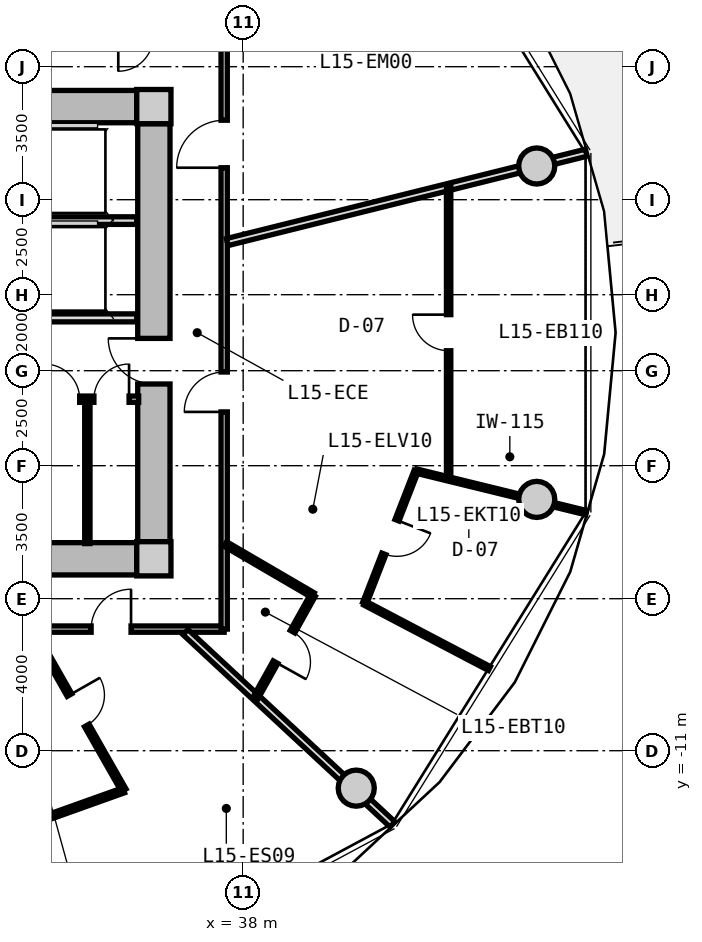
"""IFC4 building model, lengths in metres.
Left out: names, types, materials, properties, quantities, classifications, styles, units other than length and angle.
Written with IfcOpenShell. Run it as: python <this file> out.ifc"""

import sys

from ifc_helpers import new_model, si_unit, direction, frame, frame_2d, origin, origin_2d, place, context, subcontext, project, spatial, rectangle, circle, extrude, source, transform, mapped, element, fill, save


model = new_model("IFC4")
c1 = context("Model", 3, precision=1e-05, world=origin(), true_north=direction((0.0, 1.0)))
c2 = subcontext(c1, "Body", "Model", "MODEL_VIEW")
j1 = project(units=[si_unit("LENGTHUNIT", "METRE"), si_unit("PLANEANGLEUNIT", "RADIAN")], contexts=[c1])
p1 = place(None, origin())
s1 = spatial("IfcSite", under=j1, at=p1, CompositionType="ELEMENT")
p2 = place(p1, origin())
s2 = spatial("IfcBuilding", under=s1, at=p2, CompositionType="ELEMENT")
p3 = place(p2, frame((0.0, 0.0, 52.1)))
s3 = spatial("IfcBuildingStorey", under=s2, at=p3, CompositionType="ELEMENT", Elevation=52.1)
m1 = source(origin(), c2, "Body", "SweptSolid", [
    extrude(rectangle(XDim=0.9, YDim=0.9, at=origin_2d()), origin(), (0.0, 0.0, 1.0), 3.05),
])
for number, where, z_axis, x_axis in (
    (1, (35.65, -5.95, 0.0), (0.0, 0.0, 1.0), (1.0, 0.0, 0.0)),
    (2, (35.65, 5.95, 0.0), (0.0, 0.0, 1.0), (1.0, 0.0, 0.0)),
):
    element("IfcColumn", number, at=place(p3, frame(where, z_axis=z_axis, x_axis=x_axis)), inside=s3, PredefinedType="COLUMN", context=c2, shape_type="MappedRepresentation", body=[
        mapped(m1, transform((0.0, 0.0, 0.0), x_axis=(1.0, 0.0, 0.0), y_axis=(0.0, 1.0, 0.0), z_axis=(0.0, 0.0, 1.0), scale=1.0)),
    ])
m2 = source(origin(), c2, "Body", "SweptSolid", [
    extrude(rectangle(XDim=14.4, YDim=0.85, at=frame_2d((7.2, 0.0))), origin(), (0.0, 0.0, 1.0), 2.79),
])
for number, where, z_axis, x_axis in (
    (3, (20.8, 5.95, 0.0), (0.0, 0.0, 1.0), (1.0, 0.0, 0.0)),
    (4, (35.2, -5.95, 0.0), (0.0, 0.0, 1.0), (-1.0, 0.0, 0.0)),
):
    element("IfcWall", number, at=place(p3, frame(where, z_axis=z_axis, x_axis=x_axis)), inside=s3, PredefinedType="SHEAR", context=c2, shape_type="MappedRepresentation", body=[
        mapped(m2, transform((0.0, 0.0, 0.0), x_axis=(1.0, 0.0, 0.0), y_axis=(0.0, 1.0, 0.0), z_axis=(0.0, 0.0, 1.0), scale=1.0)),
    ])
m3 = source(origin(), c2, "Body", "SweptSolid", [
    extrude(rectangle(XDim=11.0, YDim=0.85, at=frame_2d((5.5, 0.0))), origin(), (0.0, 0.0, 1.0), 2.79),
])
p4 = place(p3, frame((35.65, 5.5, 0.0), z_axis=(0.0, 0.0, 1.0), x_axis=(0.0, -1.0, 0.0)))
e5 = element("IfcWall", 5, at=p4, inside=s3, PredefinedType="SHEAR", context=c2, shape_type="MappedRepresentation", body=[
    mapped(m3, transform((0.0, 0.0, 0.0), x_axis=(1.0, 0.0, 0.0), y_axis=(0.0, 1.0, 0.0), z_axis=(0.0, 0.0, 1.0), scale=1.0)),
])
p5 = place(p4, frame((5.65, 0.0, 0.0)))
e6 = element("IfcOpeningElement", 6, at=p5, cuts=e5, PredefinedType="OPENING", context=c2, shape_type="SweptSolid", body=[
    extrude(rectangle(XDim=1.2, YDim=2.15, at=frame_2d((0.6, 1.075))), frame((0.0, 0.435, 0.0), z_axis=(0.0, -1.0, 0.0), x_axis=(1.0, 0.0, 0.0)), (0.0, 0.0, 1.0), 0.87),
])
m4 = source(origin(), c2, "Body", "SweptSolid", [
    extrude(circle(Radius=0.475, at=origin_2d()), origin(), (0.0, 0.0, 1.0), 3.05),
])
for number, where, z_axis, x_axis in (
    (7, (45.725, 4.387, 0.0), (0.0, 0.0, 1.0), (1.0, 0.0, 0.0)),
    (8, (40.975, -11.985, 0.0), (0.0, 0.0, 1.0), (1.0, 0.0, 0.0)),
    (9, (45.725, -4.387, 0.0), (0.0, 0.0, 1.0), (1.0, 0.0, 0.0)),
):
    element("IfcColumn", number, at=place(p3, frame(where, z_axis=z_axis, x_axis=x_axis)), inside=s3, PredefinedType="COLUMN", context=c2, shape_type="MappedRepresentation", body=[
        mapped(m4, transform((0.0, 0.0, 0.0), x_axis=(1.0, 0.0, 0.0), y_axis=(0.0, 1.0, 0.0), z_axis=(0.0, 0.0, 1.0), scale=1.0)),
    ])
m5 = source(origin(), c2, "Body", "SweptSolid", [
    extrude(rectangle(XDim=3.2, YDim=0.2, at=frame_2d((1.6, 0.0))), origin(), (0.0, 0.0, 1.0), 2.775),
])
p6 = place(p3, frame((32.0, 2.95, 0.0), z_axis=(0.0, 0.0, 1.0), x_axis=(1.0, 0.0, 0.0)))
e10 = element("IfcWall", 10, at=p6, inside=s3, PredefinedType="PARTITIONING", context=c2, shape_type="MappedRepresentation", body=[
    mapped(m5, transform((0.0, 0.0, 0.0), x_axis=(1.0, 0.0, 0.0), y_axis=(0.0, 1.0, 0.0), z_axis=(0.0, 0.0, 1.0), scale=1.0)),
])
m6 = source(origin(), c2, "Body", "SweptSolid", [
    extrude(rectangle(XDim=6.66, YDim=0.21, at=frame_2d((3.33, 0.0))), origin(), (0.0, 0.0, 1.0), 2.775),
])
p7 = place(p3, frame((28.54, 0.39, 0.0), z_axis=(0.0, 0.0, 1.0), x_axis=(1.0, 0.0, 0.0)))
e11 = element("IfcWall", 11, at=p7, inside=s3, PredefinedType="PARTITIONING", context=c2, shape_type="MappedRepresentation", body=[
    mapped(m6, transform((0.0, 0.0, 0.0), x_axis=(1.0, 0.0, 0.0), y_axis=(0.0, 1.0, 0.0), z_axis=(0.0, 0.0, 1.0), scale=1.0)),
])
p8 = place(p7, frame((1.0, 0.0, 0.0)))
e12 = element("IfcOpeningElement", 12, at=p8, cuts=e11, PredefinedType="OPENING", context=c2, shape_type="SweptSolid", body=[
    extrude(rectangle(XDim=1.2, YDim=2.15, at=frame_2d((0.6, 1.075))), frame((0.0, 0.115, 0.0), z_axis=(0.0, -1.0, 0.0), x_axis=(1.0, 0.0, 0.0)), (0.0, 0.0, 1.0), 0.23),
])
m7 = source(origin(), c2, "Body", "SweptSolid", [
    extrude(rectangle(XDim=2.7, YDim=0.165, at=frame_2d((1.35, 0.0))), origin(), (0.0, 0.0, 1.0), 2.775),
])
p9 = place(p3, frame((32.55, -1.75, 0.0), z_axis=(0.0, 0.0, 1.0), x_axis=(1.0, 0.0, 0.0)))
e13 = element("IfcWall", 13, at=p9, inside=s3, PredefinedType="PARTITIONING", context=c2, shape_type="MappedRepresentation", body=[
    mapped(m7, transform((0.0, 0.0, 0.0), x_axis=(1.0, 0.0, 0.0), y_axis=(0.0, 1.0, 0.0), z_axis=(0.0, 0.0, 1.0), scale=1.0)),
])
p10 = place(p9, frame((0.222, 0.0, 0.0)))
e14 = element("IfcOpeningElement", 14, at=p10, cuts=e13, PredefinedType="OPENING", context=c2, shape_type="SweptSolid", body=[
    extrude(rectangle(XDim=0.925, YDim=2.1, at=frame_2d((0.462, 1.05))), frame((0.0, 0.093, 0.0), z_axis=(0.0, -1.0, 0.0), x_axis=(1.0, 0.0, 0.0)), (0.0, 0.0, 1.0), 0.185),
])
p11 = place(p9, frame((1.522, 0.0, 0.0)))
e15 = element("IfcOpeningElement", 15, at=p11, cuts=e13, PredefinedType="OPENING", context=c2, shape_type="SweptSolid", body=[
    extrude(rectangle(XDim=0.925, YDim=2.1, at=frame_2d((0.462, 1.05))), frame((0.0, 0.093, 0.0), z_axis=(0.0, -1.0, 0.0), x_axis=(1.0, 0.0, 0.0)), (0.0, 0.0, 1.0), 0.185),
])
m8 = source(origin(), c2, "Body", "SweptSolid", [
    extrude(rectangle(XDim=3.8, YDim=0.14, at=frame_2d((1.9, 0.0))), origin(), (0.0, 0.0, 1.0), 2.775),
])
p12 = place(p3, frame((33.9, -5.55, 0.0), z_axis=(0.0, 0.0, 1.0), x_axis=(0.0, 1.0, 0.0)))
e16 = element("IfcWall", 16, at=p12, inside=s3, PredefinedType="PARTITIONING", context=c2, shape_type="MappedRepresentation", body=[
    mapped(m8, transform((0.0, 0.0, 0.0), x_axis=(1.0, 0.0, 0.0), y_axis=(0.0, 1.0, 0.0), z_axis=(0.0, 0.0, 1.0), scale=1.0)),
])
m9 = source(origin(), c2, "Body", "SweptSolid", [
    extrude(rectangle(XDim=19.0, YDim=0.165, at=frame_2d((9.5, 0.0))), origin(), (0.0, 0.0, 1.0), 2.775),
])
p13 = place(p3, frame((37.5, -7.8, 0.0), z_axis=(0.0, 0.0, 1.0), x_axis=(-1.0, 0.0, 0.0)))
e17 = element("IfcWall", 17, at=p13, inside=s3, PredefinedType="PARTITIONING", context=c2, shape_type="MappedRepresentation", body=[
    mapped(m9, transform((0.0, 0.0, 0.0), x_axis=(1.0, 0.0, 0.0), y_axis=(0.0, 1.0, 0.0), z_axis=(0.0, 0.0, 1.0), scale=1.0)),
])
p14 = place(p13, frame((12.706, 0.0, 0.0)))
e18 = element("IfcOpeningElement", 18, at=p14, cuts=e17, PredefinedType="OPENING", context=c2, shape_type="SweptSolid", body=[
    extrude(rectangle(XDim=1.05, YDim=2.15, at=frame_2d((0.525, 1.075))), frame((0.0, 0.093, 0.0), z_axis=(0.0, -1.0, 0.0), x_axis=(1.0, 0.0, 0.0)), (0.0, 0.0, 1.0), 0.185),
])
p15 = place(p13, frame((7.959, 0.0, 0.0)))
e19 = element("IfcOpeningElement", 19, at=p15, cuts=e17, PredefinedType="OPENING", context=c2, shape_type="SweptSolid", body=[
    extrude(rectangle(XDim=1.05, YDim=2.15, at=frame_2d((0.525, 1.075))), frame((0.0, 0.093, 0.0), z_axis=(0.0, -1.0, 0.0), x_axis=(1.0, 0.0, 0.0)), (0.0, 0.0, 1.0), 0.185),
])
p16 = place(p13, frame((2.451, 0.0, 0.0)))
e20 = element("IfcOpeningElement", 20, at=p16, cuts=e17, PredefinedType="OPENING", context=c2, shape_type="SweptSolid", body=[
    extrude(rectangle(XDim=1.05, YDim=2.15, at=frame_2d((0.525, 1.075))), frame((0.0, 0.093, 0.0), z_axis=(0.0, -1.0, 0.0), x_axis=(1.0, 0.0, 0.0)), (0.0, 0.0, 1.0), 0.185),
])
m10 = source(origin(), c2, "Body", "SweptSolid", [
    extrude(rectangle(XDim=15.6, YDim=0.165, at=frame_2d((7.8, 0.0))), origin(), (0.0, 0.0, 1.0), 2.775),
])
p17 = place(p3, frame((37.5, 7.8, 0.0), z_axis=(0.0, 0.0, 1.0), x_axis=(0.0, -1.0, 0.0)))
e21 = element("IfcWall", 21, at=p17, inside=s3, PredefinedType="PARTITIONING", context=c2, shape_type="MappedRepresentation", body=[
    mapped(m10, transform((0.0, 0.0, 0.0), x_axis=(1.0, 0.0, 0.0), y_axis=(0.0, 1.0, 0.0), z_axis=(0.0, 0.0, 1.0), scale=1.0)),
])
p18 = place(p17, frame((8.835, 0.0, 0.0)))
e22 = element("IfcOpeningElement", 22, at=p18, cuts=e21, PredefinedType="OPENING", context=c2, shape_type="SweptSolid", body=[
    extrude(rectangle(XDim=1.05, YDim=2.15, at=frame_2d((0.525, 1.075))), frame((0.0, 0.093, 0.0), z_axis=(0.0, -1.0, 0.0), x_axis=(1.0, 0.0, 0.0)), (0.0, 0.0, 1.0), 0.185),
])
p19 = place(p17, frame((2.208, 0.0, 0.0)))
e23 = element("IfcOpeningElement", 23, at=p19, cuts=e21, PredefinedType="OPENING", context=c2, shape_type="SweptSolid", body=[
    extrude(rectangle(XDim=1.25, YDim=2.2, at=frame_2d((0.625, 1.1))), frame((0.0, 0.093, 0.0), z_axis=(0.0, -1.0, 0.0), x_axis=(1.0, 0.0, 0.0)), (0.0, 0.0, 1.0), 0.185),
])
m11 = source(origin(), c2, "Body", "SweptSolid", [
    extrude(rectangle(XDim=10.196, YDim=0.19, at=frame_2d((5.098, 0.0))), origin(), (0.0, 0.0, 1.0), 2.225),
])
p20 = place(p3, frame((30.273, -7.88, 0.0), z_axis=(0.0, 0.0, 1.0), x_axis=(0.277136420347, -0.960830580549, 0.0)))
e24 = element("IfcWall", 24, at=p20, inside=s3, PredefinedType="PARTITIONING", context=c2, shape_type="MappedRepresentation", body=[
    mapped(m11, transform((0.0, 0.0, 0.0), x_axis=(1.0, 0.0, 0.0), y_axis=(0.0, 1.0, 0.0), z_axis=(0.0, 0.0, 1.0), scale=1.0)),
])
m12 = source(origin(), c2, "Body", "SweptSolid", [
    extrude(rectangle(XDim=7.435, YDim=0.19, at=frame_2d((3.717, 0.0))), origin(), (0.0, 0.0, 1.0), 2.225),
])
p21 = place(p3, frame((36.483, -7.88, 0.0), z_axis=(0.0, 0.0, 1.0), x_axis=(0.732651956848, -0.680603489652, 0.0)))
e25 = element("IfcWall", 25, at=p21, inside=s3, PredefinedType="PARTITIONING", context=c2, shape_type="MappedRepresentation", body=[
    mapped(m12, transform((0.0, 0.0, 0.0), x_axis=(1.0, 0.0, 0.0), y_axis=(0.0, 1.0, 0.0), z_axis=(0.0, 0.0, 1.0), scale=1.0)),
])
m13 = source(origin(), c2, "Body", "SweptSolid", [
    extrude(rectangle(XDim=4.846, YDim=0.14, at=frame_2d((2.423, 0.0))), origin(), (0.0, 0.0, 1.0), 2.775),
])
p22 = place(p3, frame((32.458, -7.83, 0.0), z_axis=(0.0, 0.0, 1.0), x_axis=(0.494841788743, -0.868983086207, 0.0)))
e26 = element("IfcWall", 26, at=p22, inside=s3, PredefinedType="PARTITIONING", context=c2, shape_type="MappedRepresentation", body=[
    mapped(m13, transform((0.0, 0.0, 0.0), x_axis=(1.0, 0.0, 0.0), y_axis=(0.0, 1.0, 0.0), z_axis=(0.0, 0.0, 1.0), scale=1.0)),
])
p23 = place(p22, frame((1.963, 0.0, 0.0)))
e27 = element("IfcOpeningElement", 27, at=p23, cuts=e26, PredefinedType="OPENING", context=c2, shape_type="SweptSolid", body=[
    extrude(rectangle(XDim=0.92, YDim=2.1, at=frame_2d((0.46, 1.05))), frame((0.0, 0.08, 0.0), z_axis=(0.0, -1.0, 0.0), x_axis=(1.0, 0.0, 0.0)), (0.0, 0.0, 1.0), 0.16),
])
m14 = source(origin(), c2, "Body", "SweptSolid", [
    extrude(rectangle(XDim=3.276, YDim=0.14, at=frame_2d((1.638, 0.0))), origin(), (0.0, 0.0, 1.0), 2.415),
])
p24 = place(p3, frame((34.857, -12.042, 0.0), z_axis=(0.0, 0.0, 1.0), x_axis=(-0.94174696961, -0.336322234221, 0.0)))
e28 = element("IfcWall", 28, at=p24, inside=s3, PredefinedType="PARTITIONING", context=c2, shape_type="MappedRepresentation", body=[
    mapped(m14, transform((0.0, 0.0, 0.0), x_axis=(1.0, 0.0, 0.0), y_axis=(0.0, 1.0, 0.0), z_axis=(0.0, 0.0, 1.0), scale=1.0)),
])
m15 = source(origin(), c2, "Body", "SweptSolid", [
    extrude(rectangle(XDim=9.737, YDim=0.19, at=frame_2d((4.869, 0.0))), origin(), (0.0, 0.0, 1.0), 2.225),
])
p25 = place(p3, frame((37.58, 2.385, 0.0), z_axis=(0.0, 0.0, 1.0), x_axis=(0.970392716238, 0.241532557375, 0.0)))
e29 = element("IfcWall", 29, at=p25, inside=s3, PredefinedType="PARTITIONING", context=c2, shape_type="MappedRepresentation", body=[
    mapped(m15, transform((0.0, 0.0, 0.0), x_axis=(1.0, 0.0, 0.0), y_axis=(0.0, 1.0, 0.0), z_axis=(0.0, 0.0, 1.0), scale=1.0)),
])
m16 = source(origin(), c2, "Body", "SweptSolid", [
    extrude(rectangle(XDim=7.709, YDim=0.115, at=frame_2d((3.855, 0.0))), origin(), (0.0, 0.0, 1.0), 2.775),
])
p26 = place(p3, frame((43.406, -3.855, 0.0), z_axis=(0.0, 0.0, 1.0), x_axis=(0.0, 1.0, 0.0)))
e30 = element("IfcWall", 30, at=p26, inside=s3, PredefinedType="PARTITIONING", context=c2, shape_type="MappedRepresentation", body=[
    mapped(m16, transform((0.0, 0.0, 0.0), x_axis=(1.0, 0.0, 0.0), y_axis=(0.0, 1.0, 0.0), z_axis=(0.0, 0.0, 1.0), scale=1.0)),
])
p27 = place(p26, frame((3.38, 0.0, 0.0)))
e31 = element("IfcOpeningElement", 31, at=p27, cuts=e30, PredefinedType="OPENING", context=c2, shape_type="SweptSolid", body=[
    extrude(rectangle(XDim=0.95, YDim=2.1, at=frame_2d((0.475, 1.05))), frame((0.0, 0.067, 0.0), z_axis=(0.0, -1.0, 0.0), x_axis=(1.0, 0.0, 0.0)), (0.0, 0.0, 1.0), 0.135),
])
m17 = source(origin(), c2, "Body", "SweptSolid", [
    extrude(rectangle(XDim=4.608, YDim=0.115, at=frame_2d((2.304, 0.0))), origin(), (0.0, 0.0, 1.0), 2.225),
])
p28 = place(p3, frame((42.553, -3.641, 0.0), z_axis=(0.0, 0.0, 1.0), x_axis=(0.97135200068, -0.237645304552, 0.0)))
e32 = element("IfcWall", 32, at=p28, inside=s3, PredefinedType="PARTITIONING", context=c2, shape_type="MappedRepresentation", body=[
    mapped(m17, transform((0.0, 0.0, 0.0), x_axis=(1.0, 0.0, 0.0), y_axis=(0.0, 1.0, 0.0), z_axis=(0.0, 0.0, 1.0), scale=1.0)),
])
m18 = source(origin(), c2, "Body", "SweptSolid", [
    extrude(rectangle(XDim=2.669, YDim=0.14, at=frame_2d((1.335, 0.0))), origin(), (0.0, 0.0, 1.0), 2.775),
])
p29 = place(p3, frame((37.53, -5.561, 0.0), z_axis=(0.0, 0.0, 1.0), x_axis=(0.86369928178, -0.50400749067, 0.0)))
e33 = element("IfcWall", 33, at=p29, inside=s3, PredefinedType="PARTITIONING", context=c2, shape_type="MappedRepresentation", body=[
    mapped(m18, transform((0.0, 0.0, 0.0), x_axis=(1.0, 0.0, 0.0), y_axis=(0.0, 1.0, 0.0), z_axis=(0.0, 0.0, 1.0), scale=1.0)),
])
m19 = source(origin(), c2, "Body", "SweptSolid", [
    extrude(rectangle(XDim=3.121, YDim=0.14, at=frame_2d((1.561, 0.0))), origin(), (0.0, 0.0, 1.0), 2.775),
])
p30 = place(p3, frame((39.836, -6.906, 0.0), z_axis=(0.0, 0.0, 1.0), x_axis=(-0.487302357327, -0.873233309342, 0.0)))
e34 = element("IfcWall", 34, at=p30, inside=s3, PredefinedType="PARTITIONING", context=c2, shape_type="MappedRepresentation", body=[
    mapped(m19, transform((0.0, 0.0, 0.0), x_axis=(1.0, 0.0, 0.0), y_axis=(0.0, 1.0, 0.0), z_axis=(0.0, 0.0, 1.0), scale=1.0)),
])
p31 = place(p30, frame((1.101, 0.0, 0.0)))
e35 = element("IfcOpeningElement", 35, at=p31, cuts=e34, PredefinedType="OPENING", context=c2, shape_type="SweptSolid", body=[
    extrude(rectangle(XDim=0.92, YDim=2.1, at=frame_2d((0.46, 1.05))), frame((0.0, 0.08, 0.0), z_axis=(0.0, -1.0, 0.0), x_axis=(1.0, 0.0, 0.0)), (0.0, 0.0, 1.0), 0.16),
])
m20 = source(origin(), c2, "Body", "SweptSolid", [
    extrude(rectangle(XDim=3.706, YDim=0.115, at=frame_2d((1.853, 0.0))), origin(), (0.0, 0.0, 1.0), 2.775),
])
p32 = place(p3, frame((41.198, -7.115, 0.0), z_axis=(0.0, 0.0, 1.0), x_axis=(0.88538502503, -0.464858427322, 0.0)))
e36 = element("IfcWall", 36, at=p32, inside=s3, PredefinedType="PARTITIONING", context=c2, shape_type="MappedRepresentation", body=[
    mapped(m20, transform((0.0, 0.0, 0.0), x_axis=(1.0, 0.0, 0.0), y_axis=(0.0, 1.0, 0.0), z_axis=(0.0, 0.0, 1.0), scale=1.0)),
])
m21 = source(origin(), c2, "Body", "SweptSolid", [
    extrude(rectangle(XDim=3.729, YDim=0.115, at=frame_2d((1.864, 0.0))), origin(), (0.0, 0.0, 1.0), 2.775),
])
p33 = place(p3, frame((41.198, -7.115, 0.0), z_axis=(0.0, 0.0, 1.0), x_axis=(0.363055991464, 0.93176732453, 0.0)))
e37 = element("IfcWall", 37, at=p33, inside=s3, PredefinedType="PARTITIONING", context=c2, shape_type="MappedRepresentation", body=[
    mapped(m21, transform((0.0, 0.0, 0.0), x_axis=(1.0, 0.0, 0.0), y_axis=(0.0, 1.0, 0.0), z_axis=(0.0, 0.0, 1.0), scale=1.0)),
])
p34 = place(p33, frame((1.389, 0.0, 0.0)))
e38 = element("IfcOpeningElement", 38, at=p34, cuts=e37, PredefinedType="OPENING", context=c2, shape_type="SweptSolid", body=[
    extrude(rectangle(XDim=0.95, YDim=2.1, at=frame_2d((0.475, 1.05))), frame((0.0, 0.067, 0.0), z_axis=(0.0, -1.0, 0.0), x_axis=(1.0, 0.0, 0.0)), (0.0, 0.0, 1.0), 0.135),
])
m22 = source(origin(), c2, "Body", "SweptSolid", [
    extrude(rectangle(XDim=1.2, YDim=2.15, at=frame_2d((0.6, 1.075))), frame((0.0, 0.025, 0.0), z_axis=(0.0, -1.0, 0.0), x_axis=(1.0, 0.0, 0.0)), (0.0, 0.0, 1.0), 0.05),
])
p35 = place(p5, frame((1.2, 0.0, 0.0), z_axis=(0.0, 0.0, 1.0), x_axis=(-1.0, 0.0, 0.0)))
e39 = element("IfcDoor", 39, at=p35, inside=s3, OperationType="SINGLE_SWING_RIGHT", PredefinedType="DOOR", context=c2, shape_type="MappedRepresentation", body=[
    mapped(m22, transform((0.0, 0.0, 0.0), x_axis=(1.0, 0.0, 0.0), y_axis=(0.0, 1.0, 0.0), z_axis=(0.0, 0.0, 1.0), scale=1.0)),
])
fill(e6, e39)
m23 = source(origin(), c2, "Body", "SweptSolid", [
    extrude(rectangle(XDim=0.925, YDim=2.1, at=frame_2d((0.462, 1.05))), frame((0.0, 0.025, 0.0), z_axis=(0.0, -1.0, 0.0), x_axis=(1.0, 0.0, 0.0)), (0.0, 0.0, 1.0), 0.05),
])
p36 = place(p10, origin())
e40 = element("IfcDoor", 40, at=p36, inside=s3, OperationType="SINGLE_SWING_LEFT", PredefinedType="DOOR", context=c2, shape_type="MappedRepresentation", body=[
    mapped(m23, transform((0.0, 0.0, 0.0), x_axis=(1.0, 0.0, 0.0), y_axis=(0.0, 1.0, 0.0), z_axis=(0.0, 0.0, 1.0), scale=1.0)),
])
fill(e14, e40)
p37 = place(p11, origin())
e41 = element("IfcDoor", 41, at=p37, inside=s3, OperationType="SINGLE_SWING_RIGHT", PredefinedType="DOOR", context=c2, shape_type="MappedRepresentation", body=[
    mapped(m23, transform((0.0, 0.0, 0.0), x_axis=(1.0, 0.0, 0.0), y_axis=(0.0, 1.0, 0.0), z_axis=(0.0, 0.0, 1.0), scale=1.0)),
])
fill(e15, e41)
m24 = source(origin(), c2, "Body", "SweptSolid", [
    extrude(rectangle(XDim=1.05, YDim=2.15, at=frame_2d((0.525, 1.075))), frame((0.0, 0.025, 0.0), z_axis=(0.0, -1.0, 0.0), x_axis=(1.0, 0.0, 0.0)), (0.0, 0.0, 1.0), 0.05),
])
p38 = place(p16, frame((1.05, 0.0, 0.0), z_axis=(0.0, 0.0, 1.0), x_axis=(-1.0, 0.0, 0.0)))
e42 = element("IfcDoor", 42, at=p38, inside=s3, OperationType="SINGLE_SWING_RIGHT", PredefinedType="DOOR", context=c2, shape_type="MappedRepresentation", body=[
    mapped(m24, transform((0.0, 0.0, 0.0), x_axis=(1.0, 0.0, 0.0), y_axis=(0.0, 1.0, 0.0), z_axis=(0.0, 0.0, 1.0), scale=1.0)),
])
fill(e20, e42)
m25 = source(origin(), c2, "Body", "SweptSolid", [
    extrude(rectangle(XDim=0.92, YDim=2.1, at=frame_2d((0.46, 1.05))), frame((0.0, 0.025, 0.0), z_axis=(0.0, -1.0, 0.0), x_axis=(1.0, 0.0, 0.0)), (0.0, 0.0, 1.0), 0.05),
])
p39 = place(p23, origin())
e43 = element("IfcDoor", 43, at=p39, inside=s3, OperationType="SINGLE_SWING_LEFT", PredefinedType="DOOR", context=c2, shape_type="MappedRepresentation", body=[
    mapped(m25, transform((0.0, 0.0, 0.0), x_axis=(1.0, 0.0, 0.0), y_axis=(0.0, 1.0, 0.0), z_axis=(0.0, 0.0, 1.0), scale=1.0)),
])
fill(e27, e43)
p40 = place(p18, frame((1.05, 0.0, 0.0), z_axis=(0.0, 0.0, 1.0), x_axis=(-1.0, 0.0, 0.0)))
e44 = element("IfcDoor", 44, at=p40, inside=s3, OperationType="SINGLE_SWING_LEFT", PredefinedType="DOOR", context=c2, shape_type="MappedRepresentation", body=[
    mapped(m24, transform((0.0, 0.0, 0.0), x_axis=(1.0, 0.0, 0.0), y_axis=(0.0, 1.0, 0.0), z_axis=(0.0, 0.0, 1.0), scale=1.0)),
])
fill(e22, e44)
p41 = place(p31, origin())
e45 = element("IfcDoor", 45, at=p41, inside=s3, OperationType="SINGLE_SWING_RIGHT", PredefinedType="DOOR", context=c2, shape_type="MappedRepresentation", body=[
    mapped(m25, transform((0.0, 0.0, 0.0), x_axis=(1.0, 0.0, 0.0), y_axis=(0.0, 1.0, 0.0), z_axis=(0.0, 0.0, 1.0), scale=1.0)),
])
fill(e35, e45)
m26 = source(origin(), c2, "Body", "SweptSolid", [
    extrude(rectangle(XDim=0.95, YDim=2.1, at=frame_2d((0.475, 1.05))), frame((0.0, 0.025, 0.0), z_axis=(0.0, -1.0, 0.0), x_axis=(1.0, 0.0, 0.0)), (0.0, 0.0, 1.0), 0.05),
])
p42 = place(p34, frame((0.95, 0.0, 0.0), z_axis=(0.0, 0.0, 1.0), x_axis=(-1.0, 0.0, 0.0)))
e46 = element("IfcDoor", 46, at=p42, inside=s3, OperationType="SINGLE_SWING_LEFT", PredefinedType="DOOR", context=c2, shape_type="MappedRepresentation", body=[
    mapped(m26, transform((0.0, 0.0, 0.0), x_axis=(1.0, 0.0, 0.0), y_axis=(0.0, 1.0, 0.0), z_axis=(0.0, 0.0, 1.0), scale=1.0)),
])
fill(e38, e46)
p43 = place(p27, origin())
e47 = element("IfcDoor", 47, at=p43, inside=s3, OperationType="SINGLE_SWING_RIGHT", PredefinedType="DOOR", context=c2, shape_type="MappedRepresentation", body=[
    mapped(m26, transform((0.0, 0.0, 0.0), x_axis=(1.0, 0.0, 0.0), y_axis=(0.0, 1.0, 0.0), z_axis=(0.0, 0.0, 1.0), scale=1.0)),
])
fill(e31, e47)
m27 = source(origin(), c2, "Body", "SweptSolid", [
    extrude(rectangle(XDim=1.25, YDim=2.2, at=frame_2d((0.625, 1.1))), frame((0.0, 0.025, 0.0), z_axis=(0.0, -1.0, 0.0), x_axis=(1.0, 0.0, 0.0)), (0.0, 0.0, 1.0), 0.05),
])
p44 = place(p19, frame((1.25, 0.0, 0.0), z_axis=(0.0, 0.0, 1.0), x_axis=(-1.0, 0.0, 0.0)))
e48 = element("IfcDoor", 48, at=p44, inside=s3, OperationType="SINGLE_SWING_LEFT", PredefinedType="DOOR", context=c2, shape_type="MappedRepresentation", body=[
    mapped(m27, transform((0.0, 0.0, 0.0), x_axis=(1.0, 0.0, 0.0), y_axis=(0.0, 1.0, 0.0), z_axis=(0.0, 0.0, 1.0), scale=1.0)),
])
fill(e23, e48)
save(model, sys.argv[1])
